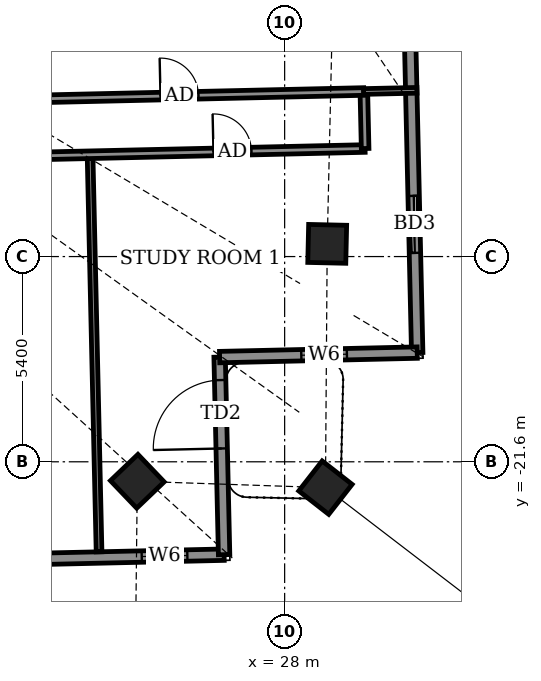
"""IFC4 building model, lengths in metres.
Left out: names, types, materials, properties, quantities, classifications, styles, units other than length and angle.
Written with IfcOpenShell. Run it as: python <this file> out.ifc"""

import sys

from ifc_helpers import new_model, si_unit, direction, frame, frame_2d, origin, origin_2d, place, context, subcontext, project, spatial, rectangle, extrude, element, fill, save


model = new_model("IFC4")
c1 = context("Model", 3, precision=1e-05, world=origin(), true_north=direction((0.0, 1.0)))
c2 = subcontext(c1, "Body", "Model", "MODEL_VIEW")
j1 = project(units=[si_unit("LENGTHUNIT", "METRE"), si_unit("PLANEANGLEUNIT", "RADIAN")], contexts=[c1])
p1 = place(None, origin())
s1 = spatial("IfcSite", under=j1, at=p1, CompositionType="ELEMENT")
p2 = place(p1, origin())
s2 = spatial("IfcBuilding", under=s1, at=p2, CompositionType="ELEMENT")
p3 = place(p2, frame((0.0, 0.0, 275.3)))
s3 = spatial("IfcBuildingStorey", under=s2, at=p3, CompositionType="ELEMENT", Elevation=275.3)
for number, where, z_axis, x_axis in (
    (1, (24.124, -22.113, -0.55), (0.0, 0.0, 1.0), (0.723, 0.691, 0.0)),
    (2, (29.074, -22.28, -0.55), (0.0, 0.0, 1.0), (0.615, 0.788, 0.0)),
    (3, (29.12, -15.866, -0.55), (0.0, 0.0, 1.0), (0.023, 1.0, 0.0)),
):
    element("IfcColumn", number, at=place(p3, frame(where, z_axis=z_axis, x_axis=x_axis)), inside=s3, PredefinedType="COLUMN", context=c2, shape_type="SweptSolid", body=[
        extrude(rectangle(XDim=1.0, YDim=1.0, at=origin_2d()), origin(), (0.0, 0.0, 1.0), 4.6),
    ])
p4 = place(p3, frame((31.488, -18.727, 0.0), z_axis=(0.0, 0.0, 1.0), x_axis=(-0.022702091108, 0.999742274318, 0.0)))
e4 = element("IfcWall", 4, at=p4, inside=s3, PredefinedType="SOLIDWALL", context=c2, shape_type="SweptSolid", body=[
    extrude(rectangle(XDim=14.357, YDim=0.3, at=frame_2d((7.178, 0.0))), origin(), (0.0, 0.0, 1.0), 2.35),
])
p5 = place(p4, frame((2.625, 0.0, 0.0)))
e5 = element("IfcOpeningElement", 5, at=p5, cuts=e4, PredefinedType="OPENING", context=c2, shape_type="SweptSolid", body=[
    extrude(rectangle(XDim=1.5, YDim=2.0, at=frame_2d((0.75, 1.0))), frame((0.0, 0.16, 0.0), z_axis=(0.0, -1.0, 0.0), x_axis=(1.0, 0.0, 0.0)), (0.0, 0.0, 1.0), 0.32),
])
p6 = place(p4, frame((8.301, 0.0, 0.5)))
e6 = element("IfcOpeningElement", 6, at=p6, cuts=e4, PredefinedType="OPENING", context=c2, shape_type="SweptSolid", body=[
    extrude(rectangle(XDim=1.2, YDim=1.1, at=frame_2d((0.6, 0.55))), frame((0.0, 0.16, 0.0), z_axis=(0.0, -1.0, 0.0), x_axis=(1.0, 0.0, 0.0)), (0.0, 0.0, 1.0), 0.32),
])
p7 = place(p3, frame((-22.816, -25.161, 0.0), z_axis=(0.0, 0.0, 1.0), x_axis=(0.999742646411, 0.022685699159, 0.0)))
e7 = element("IfcWall", 7, at=p7, inside=s3, PredefinedType="SOLIDWALL", context=c2, shape_type="SweptSolid", body=[
    extrude(rectangle(XDim=49.236, YDim=0.3, at=frame_2d((24.618, 0.0))), origin(), (0.0, 0.0, 1.0), 2.1),
])
p8 = place(p7, frame((2.56, 0.0, 0.0)))
e8 = element("IfcOpeningElement", 8, at=p8, cuts=e7, PredefinedType="OPENING", context=c2, shape_type="SweptSolid", body=[
    extrude(rectangle(XDim=1.5, YDim=2.0, at=frame_2d((0.75, 1.0))), frame((0.0, 0.16, 0.0), z_axis=(0.0, -1.0, 0.0), x_axis=(1.0, 0.0, 0.0)), (0.0, 0.0, 1.0), 0.32),
])
p9 = place(p7, frame((9.417, 0.0, 0.5)))
e9 = element("IfcOpeningElement", 9, at=p9, cuts=e7, PredefinedType="OPENING", context=c2, shape_type="SweptSolid", body=[
    extrude(rectangle(XDim=1.2, YDim=1.1, at=frame_2d((0.6, 0.55))), frame((0.0, 0.16, 0.0), z_axis=(0.0, -1.0, 0.0), x_axis=(1.0, 0.0, 0.0)), (0.0, 0.0, 1.0), 0.32),
])
p10 = place(p7, frame((15.664, 0.0, 0.5)))
e10 = element("IfcOpeningElement", 10, at=p10, cuts=e7, PredefinedType="OPENING", context=c2, shape_type="SweptSolid", body=[
    extrude(rectangle(XDim=1.2, YDim=1.1, at=frame_2d((0.6, 0.55))), frame((0.0, 0.16, 0.0), z_axis=(0.0, -1.0, 0.0), x_axis=(1.0, 0.0, 0.0)), (0.0, 0.0, 1.0), 0.32),
])
p11 = place(p7, frame((21.326, 0.0, 0.0)))
e11 = element("IfcOpeningElement", 11, at=p11, cuts=e7, PredefinedType="OPENING", context=c2, shape_type="SweptSolid", body=[
    extrude(rectangle(XDim=1.5, YDim=2.0, at=frame_2d((0.75, 1.0))), frame((0.0, 0.16, 0.0), z_axis=(0.0, -1.0, 0.0), x_axis=(1.0, 0.0, 0.0)), (0.0, 0.0, 1.0), 0.32),
])
p12 = place(p7, frame((25.575, 0.0, 0.0)))
e12 = element("IfcOpeningElement", 12, at=p12, cuts=e7, PredefinedType="OPENING", context=c2, shape_type="SweptSolid", body=[
    extrude(rectangle(XDim=1.5, YDim=2.0, at=frame_2d((0.75, 1.0))), frame((0.0, 0.16, 0.0), z_axis=(0.0, -1.0, 0.0), x_axis=(1.0, 0.0, 0.0)), (0.0, 0.0, 1.0), 0.32),
])
p13 = place(p7, frame((30.5, 0.0, 0.0)))
e13 = element("IfcOpeningElement", 13, at=p13, cuts=e7, PredefinedType="OPENING", context=c2, shape_type="SweptSolid", body=[
    extrude(rectangle(XDim=1.5, YDim=2.0, at=frame_2d((0.75, 1.0))), frame((0.0, 0.16, 0.0), z_axis=(0.0, -1.0, 0.0), x_axis=(1.0, 0.0, 0.0)), (0.0, 0.0, 1.0), 0.32),
])
p14 = place(p7, frame((35.425, 0.0, 0.0)))
e14 = element("IfcOpeningElement", 14, at=p14, cuts=e7, PredefinedType="OPENING", context=c2, shape_type="SweptSolid", body=[
    extrude(rectangle(XDim=1.5, YDim=2.0, at=frame_2d((0.75, 1.0))), frame((0.0, 0.16, 0.0), z_axis=(0.0, -1.0, 0.0), x_axis=(1.0, 0.0, 0.0)), (0.0, 0.0, 1.0), 0.32),
])
p15 = place(p7, frame((41.7, 0.0, 0.5)))
e15 = element("IfcOpeningElement", 15, at=p15, cuts=e7, PredefinedType="OPENING", context=c2, shape_type="SweptSolid", body=[
    extrude(rectangle(XDim=1.2, YDim=1.1, at=frame_2d((0.6, 0.55))), frame((0.0, 0.16, 0.0), z_axis=(0.0, -1.0, 0.0), x_axis=(1.0, 0.0, 0.0)), (0.0, 0.0, 1.0), 0.32),
])
p16 = place(p7, frame((47.068, 0.0, 0.5)))
e16 = element("IfcOpeningElement", 16, at=p16, cuts=e7, PredefinedType="OPENING", context=c2, shape_type="SweptSolid", body=[
    extrude(rectangle(XDim=1.2, YDim=1.1, at=frame_2d((0.6, 0.55))), frame((0.0, 0.16, 0.0), z_axis=(0.0, -1.0, 0.0), x_axis=(1.0, 0.0, 0.0)), (0.0, 0.0, 1.0), 0.32),
])
p17 = place(p3, frame((26.407, -24.044, 0.0), z_axis=(0.0, 0.0, 1.0), x_axis=(-0.022675548694, 0.99974287669, 0.0)))
e17 = element("IfcWall", 17, at=p17, inside=s3, PredefinedType="SOLIDWALL", context=c2, shape_type="SweptSolid", body=[
    extrude(rectangle(XDim=5.2, YDim=0.3, at=frame_2d((2.6, 0.0))), origin(), (0.0, 0.0, 1.0), 2.25),
])
p18 = place(p17, frame((2.795, 0.0, 0.0)))
e18 = element("IfcOpeningElement", 18, at=p18, cuts=e17, PredefinedType="OPENING", context=c2, shape_type="SweptSolid", body=[
    extrude(rectangle(XDim=1.8, YDim=2.0, at=frame_2d((0.9, 1.0))), frame((0.0, 0.16, 0.0), z_axis=(0.0, -1.0, 0.0), x_axis=(1.0, 0.0, 0.0)), (0.0, 0.0, 1.0), 0.32),
])
p19 = place(p3, frame((26.289, -18.845, 0.0), z_axis=(0.0, 0.0, 1.0), x_axis=(0.99974287669, 0.022675548694, 0.0)))
e19 = element("IfcWall", 19, at=p19, inside=s3, PredefinedType="SOLIDWALL", context=c2, shape_type="SweptSolid", body=[
    extrude(rectangle(XDim=5.2, YDim=0.3, at=frame_2d((2.6, 0.0))), origin(), (0.0, 0.0, 1.0), 2.25),
])
p20 = place(p19, frame((2.15, 0.0, 0.5)))
e20 = element("IfcOpeningElement", 20, at=p20, cuts=e19, PredefinedType="OPENING", context=c2, shape_type="SweptSolid", body=[
    extrude(rectangle(XDim=1.2, YDim=1.1, at=frame_2d((0.6, 0.55))), frame((0.0, 0.16, 0.0), z_axis=(0.0, -1.0, 0.0), x_axis=(1.0, 0.0, 0.0)), (0.0, 0.0, 1.0), 0.32),
])
p21 = place(p3, frame((23.117, -23.969, 0.0), z_axis=(0.0, 0.0, 1.0), x_axis=(-0.022690865001, 0.999742529177, 0.0)))
e21 = element("IfcWall", 21, at=p21, inside=s3, PredefinedType="PARTITIONING", context=c2, shape_type="SweptSolid", body=[
    extrude(rectangle(XDim=10.351, YDim=0.15, at=frame_2d((5.175, 0.0))), origin(), (0.0, 0.0, 1.0), 2.25),
])
p22 = place(p3, frame((-23.895, -14.583, 0.0), z_axis=(0.0, 0.0, 1.0), x_axis=(0.999742444101, 0.022694613067, 0.0)))
e22 = element("IfcWall", 22, at=p22, inside=s3, PredefinedType="PARTITIONING", context=c2, shape_type="SweptSolid", body=[
    extrude(rectangle(XDim=54.025, YDim=0.2, at=frame_2d((27.012, 0.0))), origin(), (0.0, 0.0, 1.0), 2.1),
])
p23 = place(p22, frame((0.414, 0.0, 0.0)))
e23 = element("IfcOpeningElement", 23, at=p23, cuts=e22, PredefinedType="OPENING", context=c2, shape_type="SweptSolid", body=[
    extrude(rectangle(XDim=1.0, YDim=2.1, at=frame_2d((0.5, 1.05))), frame((0.0, 0.11, 0.0), z_axis=(0.0, -1.0, 0.0), x_axis=(1.0, 0.0, 0.0)), (0.0, 0.0, 1.0), 0.22),
])
p24 = place(p22, frame((6.289, 0.0, 0.0)))
e24 = element("IfcOpeningElement", 24, at=p24, cuts=e22, PredefinedType="OPENING", context=c2, shape_type="SweptSolid", body=[
    extrude(rectangle(XDim=0.9, YDim=2.1, at=frame_2d((0.45, 1.05))), frame((0.0, 0.11, 0.0), z_axis=(0.0, -1.0, 0.0), x_axis=(1.0, 0.0, 0.0)), (0.0, 0.0, 1.0), 0.22),
])
p25 = place(p22, frame((11.589, 0.0, 0.0)))
e25 = element("IfcOpeningElement", 25, at=p25, cuts=e22, PredefinedType="OPENING", context=c2, shape_type="SweptSolid", body=[
    extrude(rectangle(XDim=1.0, YDim=2.1, at=frame_2d((0.5, 1.05))), frame((0.0, 0.11, 0.0), z_axis=(0.0, -1.0, 0.0), x_axis=(1.0, 0.0, 0.0)), (0.0, 0.0, 1.0), 0.22),
])
p26 = place(p22, frame((8.689, 0.0, 0.0)))
e26 = element("IfcOpeningElement", 26, at=p26, cuts=e22, PredefinedType="OPENING", context=c2, shape_type="SweptSolid", body=[
    extrude(rectangle(XDim=0.9, YDim=2.1, at=frame_2d((0.45, 1.05))), frame((0.0, 0.11, 0.0), z_axis=(0.0, -1.0, 0.0), x_axis=(1.0, 0.0, 0.0)), (0.0, 0.0, 1.0), 0.22),
])
p27 = place(p22, frame((15.014, 0.0, 0.0)))
e27 = element("IfcOpeningElement", 27, at=p27, cuts=e22, PredefinedType="OPENING", context=c2, shape_type="SweptSolid", body=[
    extrude(rectangle(XDim=1.0, YDim=2.1, at=frame_2d((0.5, 1.05))), frame((0.0, 0.11, 0.0), z_axis=(0.0, -1.0, 0.0), x_axis=(1.0, 0.0, 0.0)), (0.0, 0.0, 1.0), 0.22),
])
p28 = place(p22, frame((18.039, 0.0, 0.0)))
e28 = element("IfcOpeningElement", 28, at=p28, cuts=e22, PredefinedType="OPENING", context=c2, shape_type="SweptSolid", body=[
    extrude(rectangle(XDim=0.9, YDim=2.1, at=frame_2d((0.45, 1.05))), frame((0.0, 0.11, 0.0), z_axis=(0.0, -1.0, 0.0), x_axis=(1.0, 0.0, 0.0)), (0.0, 0.0, 1.0), 0.22),
])
p29 = place(p22, frame((22.989, 0.0, 0.0)))
e29 = element("IfcOpeningElement", 29, at=p29, cuts=e22, PredefinedType="OPENING", context=c2, shape_type="SweptSolid", body=[
    extrude(rectangle(XDim=0.9, YDim=2.1, at=frame_2d((0.45, 1.05))), frame((0.0, 0.11, 0.0), z_axis=(0.0, -1.0, 0.0), x_axis=(1.0, 0.0, 0.0)), (0.0, 0.0, 1.0), 0.22),
])
p30 = place(p22, frame((25.514, 0.0, 0.0)))
e30 = element("IfcOpeningElement", 30, at=p30, cuts=e22, PredefinedType="OPENING", context=c2, shape_type="SweptSolid", body=[
    extrude(rectangle(XDim=0.9, YDim=2.1, at=frame_2d((0.45, 1.05))), frame((0.0, 0.11, 0.0), z_axis=(0.0, -1.0, 0.0), x_axis=(1.0, 0.0, 0.0)), (0.0, 0.0, 1.0), 0.22),
])
p31 = place(p22, frame((32.839, 0.0, 0.0)))
e31 = element("IfcOpeningElement", 31, at=p31, cuts=e22, PredefinedType="OPENING", context=c2, shape_type="SweptSolid", body=[
    extrude(rectangle(XDim=0.9, YDim=2.1, at=frame_2d((0.45, 1.05))), frame((0.0, 0.11, 0.0), z_axis=(0.0, -1.0, 0.0), x_axis=(1.0, 0.0, 0.0)), (0.0, 0.0, 1.0), 0.22),
])
p32 = place(p22, frame((35.364, 0.0, 0.0)))
e32 = element("IfcOpeningElement", 32, at=p32, cuts=e22, PredefinedType="OPENING", context=c2, shape_type="SweptSolid", body=[
    extrude(rectangle(XDim=0.9, YDim=2.1, at=frame_2d((0.45, 1.05))), frame((0.0, 0.11, 0.0), z_axis=(0.0, -1.0, 0.0), x_axis=(1.0, 0.0, 0.0)), (0.0, 0.0, 1.0), 0.22),
])
p33 = place(p22, frame((43.939, 0.0, 0.0)))
e33 = element("IfcOpeningElement", 33, at=p33, cuts=e22, PredefinedType="OPENING", context=c2, shape_type="SweptSolid", body=[
    extrude(rectangle(XDim=1.0, YDim=2.1, at=frame_2d((0.5, 1.05))), frame((0.0, 0.11, 0.0), z_axis=(0.0, -1.0, 0.0), x_axis=(1.0, 0.0, 0.0)), (0.0, 0.0, 1.0), 0.22),
])
p34 = place(p22, frame((40.339, 0.0, 0.0)))
e34 = element("IfcOpeningElement", 34, at=p34, cuts=e22, PredefinedType="OPENING", context=c2, shape_type="SweptSolid", body=[
    extrude(rectangle(XDim=0.9, YDim=2.1, at=frame_2d((0.45, 1.05))), frame((0.0, 0.11, 0.0), z_axis=(0.0, -1.0, 0.0), x_axis=(1.0, 0.0, 0.0)), (0.0, 0.0, 1.0), 0.22),
])
p35 = place(p22, frame((50.035, 0.0, 0.0)))
e35 = element("IfcOpeningElement", 35, at=p35, cuts=e22, PredefinedType="OPENING", context=c2, shape_type="SweptSolid", body=[
    extrude(rectangle(XDim=1.0, YDim=2.1, at=frame_2d((0.5, 1.05))), frame((0.0, 0.11, 0.0), z_axis=(0.0, -1.0, 0.0), x_axis=(1.0, 0.0, 0.0)), (0.0, 0.0, 1.0), 0.22),
])
p36 = place(p3, frame((30.118, -13.357, 0.0), z_axis=(0.0, 0.0, 1.0), x_axis=(-0.022617910375, 0.999744182344, 0.0)))
e36 = element("IfcWall", 36, at=p36, inside=s3, PredefinedType="PARTITIONING", context=c2, shape_type="SweptSolid", body=[
    extrude(rectangle(XDim=1.5, YDim=0.2, at=frame_2d((0.75, 0.0))), origin(), (0.0, 0.0, 1.0), 4.05),
])
p37 = place(p3, frame((18.985, -12.109, 0.0), z_axis=(0.0, 0.0, 1.0), x_axis=(0.999742346277, 0.022698921993, 0.0)))
e37 = element("IfcWall", 37, at=p37, inside=s3, PredefinedType="PARTITIONING", context=c2, shape_type="SweptSolid", body=[
    extrude(rectangle(XDim=11.1, YDim=0.2, at=frame_2d((5.55, 0.0))), origin(), (0.0, 0.0, 1.0), 2.35),
])
p38 = place(p37, frame((5.75, 0.0, 0.0)))
e38 = element("IfcOpeningElement", 38, at=p38, cuts=e37, PredefinedType="OPENING", context=c2, shape_type="SweptSolid", body=[
    extrude(rectangle(XDim=1.0, YDim=2.1, at=frame_2d((0.5, 1.05))), frame((0.0, 0.11, 0.0), z_axis=(0.0, -1.0, 0.0), x_axis=(1.0, 0.0, 0.0)), (0.0, 0.0, 1.0), 0.22),
])
p39 = place(p3, frame((30.078, -11.857, 0.0), z_axis=(0.0, 0.0, 1.0), x_axis=(0.999755917848, 0.022093092321, 0.0)))
e39 = element("IfcWall", 39, at=p39, inside=s3, PredefinedType="PARTITIONING", context=c2, shape_type="SweptSolid", body=[
    extrude(rectangle(XDim=1.403, YDim=0.15, at=frame_2d((0.702, 0.0))), origin(), (0.0, 0.0, 1.0), 2.85),
])
p40 = place(p5, origin())
e40 = element("IfcDoor", 40, at=p40, inside=s3, OperationType="SLIDING_TO_LEFT", PredefinedType="DOOR", context=c2, shape_type="SweptSolid", body=[
    extrude(rectangle(XDim=1.5, YDim=2.0, at=frame_2d((0.75, 1.0))), frame((0.0, 0.025, 0.0), z_axis=(0.0, -1.0, 0.0), x_axis=(1.0, 0.0, 0.0)), (0.0, 0.0, 1.0), 0.05),
])
fill(e5, e40)
p41 = place(p16, origin())
e41 = element("IfcWindow", 41, at=p41, inside=s3, PartitioningType="SINGLE_PANEL", PredefinedType="WINDOW", context=c2, shape_type="SweptSolid", body=[
    extrude(rectangle(XDim=1.2, YDim=1.1, at=frame_2d((0.6, 0.55))), frame((0.0, 0.03, 0.0), z_axis=(0.0, -1.0, 0.0), x_axis=(1.0, 0.0, 0.0)), (0.0, 0.0, 1.0), 0.06),
])
fill(e16, e41)
p42 = place(p18, origin())
e42 = element("IfcDoor", 42, at=p42, inside=s3, OperationType="DOUBLE_DOOR_SINGLE_SWING", PredefinedType="DOOR", context=c2, shape_type="SweptSolid", body=[
    extrude(rectangle(XDim=1.8, YDim=2.0, at=frame_2d((0.9, 1.0))), frame((0.0, 0.025, 0.0), z_axis=(0.0, -1.0, 0.0), x_axis=(1.0, 0.0, 0.0)), (0.0, 0.0, 1.0), 0.05),
])
fill(e18, e42)
p43 = place(p20, origin())
e43 = element("IfcWindow", 43, at=p43, inside=s3, PartitioningType="SINGLE_PANEL", PredefinedType="WINDOW", context=c2, shape_type="SweptSolid", body=[
    extrude(rectangle(XDim=1.2, YDim=1.1, at=frame_2d((0.6, 0.55))), frame((0.0, 0.03, 0.0), z_axis=(0.0, -1.0, 0.0), x_axis=(1.0, 0.0, 0.0)), (0.0, 0.0, 1.0), 0.06),
])
fill(e20, e43)
p44 = place(p35, origin())
e44 = element("IfcDoor", 44, at=p44, inside=s3, OperationType="SINGLE_SWING_LEFT", PredefinedType="DOOR", context=c2, shape_type="SweptSolid", body=[
    extrude(rectangle(XDim=1.0, YDim=2.1, at=frame_2d((0.5, 1.05))), frame((0.0, 0.025, 0.0), z_axis=(0.0, -1.0, 0.0), x_axis=(1.0, 0.0, 0.0)), (0.0, 0.0, 1.0), 0.05),
])
fill(e35, e44)
p45 = place(p38, origin())
e45 = element("IfcDoor", 45, at=p45, inside=s3, OperationType="SINGLE_SWING_RIGHT", PredefinedType="DOOR", context=c2, shape_type="SweptSolid", body=[
    extrude(rectangle(XDim=1.0, YDim=2.1, at=frame_2d((0.5, 1.05))), frame((0.0, 0.025, 0.0), z_axis=(0.0, -1.0, 0.0), x_axis=(1.0, 0.0, 0.0)), (0.0, 0.0, 1.0), 0.05),
])
fill(e38, e45)
save(model, sys.argv[1])
